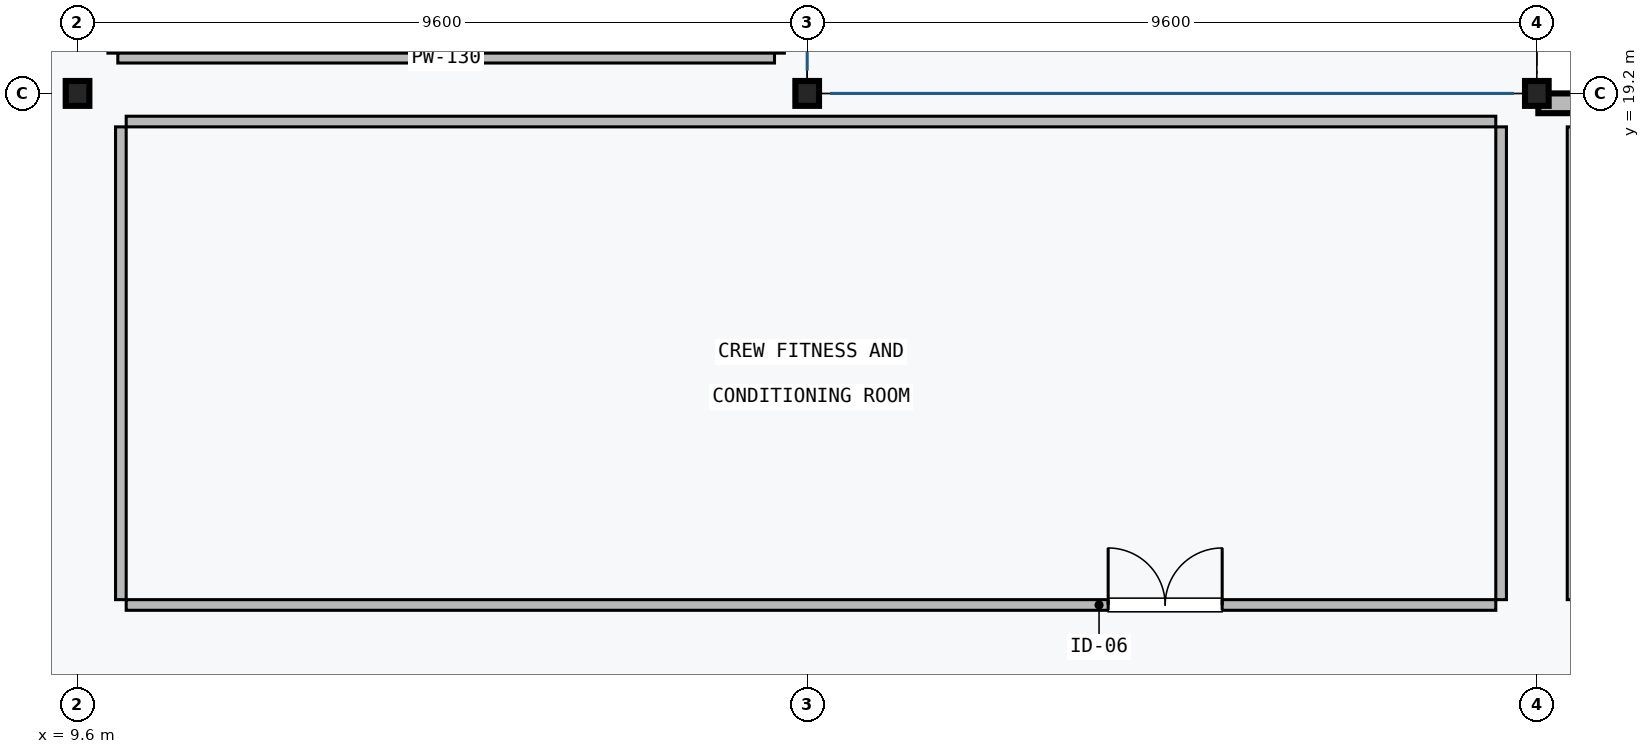
"""IFC4 building model, lengths in metres.
Left out: names, types, materials, properties, quantities, classifications, styles, units other than length and angle.
Written with IfcOpenShell. Run it as: python <this file> out.ifc"""

import sys

from ifc_helpers import new_model, si_unit, direction, frame, frame_2d, origin, origin_2d, place, context, subcontext, project, spatial, rectangle, i_section, extrude, element, fill, save


model = new_model("IFC4")
c1 = context("Model", 3, precision=1e-05, world=origin(), true_north=direction((0.0, 1.0)))
c2 = subcontext(c1, "Body", "Model", "MODEL_VIEW")
j1 = project(units=[si_unit("LENGTHUNIT", "METRE"), si_unit("PLANEANGLEUNIT", "RADIAN")], contexts=[c1])
p1 = place(None, origin())
s1 = spatial("IfcSite", under=j1, at=p1, CompositionType="ELEMENT")
p2 = place(p1, origin())
s2 = spatial("IfcBuilding", under=s1, at=p2, CompositionType="ELEMENT")
p3 = place(p2, frame((0.0, 0.0, 14.7)))
s3 = spatial("IfcBuildingStorey", under=s2, at=p3, CompositionType="ELEMENT", Elevation=14.7)
for number, where, z_axis, x_axis in (
    (1, (9.6, 19.2, 0.0), (0.0, 0.0, 1.0), (1.0, 0.0, 0.0)),
    (2, (19.2, 19.2, 0.0), (0.0, 0.0, 1.0), (1.0, 0.0, 0.0)),
    (3, (28.8, 19.2, 0.0), (0.0, 0.0, 1.0), (1.0, 0.0, 0.0)),
):
    element("IfcColumn", number, at=place(p3, frame(where, z_axis=z_axis, x_axis=x_axis)), inside=s3, PredefinedType="COLUMN", context=c2, shape_type="SweptSolid", body=[
        extrude(i_section(OverallWidth=0.311, OverallDepth=0.327, WebThickness=0.016, FlangeThickness=0.025, FilletRadius=0.015, at=origin_2d()), origin(), (0.0, 0.0, 1.0), 3.95),
    ])
p4 = place(p3, frame((28.82, 19.07, 0.0), z_axis=(0.0, 0.0, 1.0), x_axis=(1.0, 0.0, 0.0)))
e4 = element("IfcWall", 4, at=p4, inside=s3, PredefinedType="SOLIDWALL", context=c2, shape_type="SweptSolid", body=[
    extrude(rectangle(XDim=9.56, YDim=0.26, at=frame_2d((4.78, 0.0))), origin(), (0.0, 0.0, 1.0), 3.66),
])
p5 = place(p4, frame((3.28, 0.0, 0.9)))
e5 = element("IfcOpeningElement", 5, at=p5, cuts=e4, PredefinedType="OPENING", context=c2, shape_type="SweptSolid", body=[
    extrude(rectangle(XDim=3.0, YDim=2.1, at=frame_2d((1.5, 1.05))), frame((0.0, 0.14, 0.0), z_axis=(0.0, -1.0, 0.0), x_axis=(1.0, 0.0, 0.0)), (0.0, 0.0, 1.0), 0.28),
])
p6 = place(p3, frame((18.77, 19.665, 0.0), z_axis=(0.0, 0.0, 1.0), x_axis=(-1.0, 0.0, 0.0)))
e6 = element("IfcWall", 6, at=p6, inside=s3, PredefinedType="PARTITIONING", context=c2, shape_type="SweptSolid", body=[
    extrude(rectangle(XDim=8.64, YDim=0.13, at=frame_2d((4.32, 0.0))), origin(), (0.0, 0.0, 1.0), 3.59),
])
p7 = place(p3, frame((10.065, 19.73, 0.0), z_axis=(0.0, 0.0, 1.0), x_axis=(0.0, 1.0, 0.0)))
e7 = element("IfcWall", 7, at=p7, inside=s3, PredefinedType="PARTITIONING", context=c2, shape_type="SweptSolid", body=[
    extrude(rectangle(XDim=8.54, YDim=0.13, at=frame_2d((4.27, 0.0))), origin(), (0.0, 0.0, 1.0), 3.59),
])
p8 = place(p7, frame((3.78, 0.0, 0.0)))
e8 = element("IfcOpeningElement", 8, at=p8, cuts=e7, PredefinedType="OPENING", context=c2, shape_type="SweptSolid", body=[
    extrude(rectangle(XDim=0.98, YDim=2.15, at=frame_2d((0.49, 1.075))), frame((0.0, 0.075, 0.0), z_axis=(0.0, -1.0, 0.0), x_axis=(1.0, 0.0, 0.0)), (0.0, 0.0, 1.0), 0.15),
])
p9 = place(p3, frame((18.835, 28.27, 0.0), z_axis=(0.0, 0.0, 1.0), x_axis=(0.0, -1.0, 0.0)))
e9 = element("IfcWall", 9, at=p9, inside=s3, PredefinedType="PARTITIONING", context=c2, shape_type="SweptSolid", body=[
    extrude(rectangle(XDim=8.54, YDim=0.13, at=frame_2d((4.27, 0.0))), origin(), (0.0, 0.0, 1.0), 3.59),
])
p10 = place(p3, frame((28.26, 12.47, 0.0), z_axis=(0.0, 0.0, 1.0), x_axis=(-1.0, 0.0, 0.0)))
e10 = element("IfcWall", 10, at=p10, inside=s3, PredefinedType="PARTITIONING", context=c2, shape_type="SweptSolid", body=[
    extrude(rectangle(XDim=18.02, YDim=0.14, at=frame_2d((9.01, 0.0))), origin(), (0.0, 0.0, 1.0), 3.483),
])
p11 = place(p10, frame((3.6, 0.0, 0.0)))
e11 = element("IfcOpeningElement", 11, at=p11, cuts=e10, PredefinedType="OPENING", context=c2, shape_type="SweptSolid", body=[
    extrude(rectangle(XDim=1.5, YDim=2.25, at=frame_2d((0.75, 1.125))), frame((0.0, 0.08, 0.0), z_axis=(0.0, -1.0, 0.0), x_axis=(1.0, 0.0, 0.0)), (0.0, 0.0, 1.0), 0.16),
])
p12 = place(p3, frame((10.24, 18.83, 0.0), z_axis=(0.0, 0.0, 1.0), x_axis=(1.0, 0.0, 0.0)))
e12 = element("IfcWall", 12, at=p12, inside=s3, PredefinedType="PARTITIONING", context=c2, shape_type="SweptSolid", body=[
    extrude(rectangle(XDim=18.02, YDim=0.14, at=frame_2d((9.01, 0.0))), origin(), (0.0, 0.0, 1.0), 3.483),
])
for number, where, z_axis, x_axis in (
    (13, (10.17, 12.54, 0.0), (0.0, 0.0, 1.0), (0.0, 1.0, 0.0)),
    (14, (28.33, 18.76, 0.0), (0.0, 0.0, 1.0), (0.0, -1.0, 0.0)),
    (15, (29.27, 12.54, 0.0), (0.0, 0.0, 1.0), (0.0, 1.0, 0.0)),
):
    element("IfcWall", number, at=place(p3, frame(where, z_axis=z_axis, x_axis=x_axis)), inside=s3, PredefinedType="PARTITIONING", context=c2, shape_type="SweptSolid", body=[
        extrude(rectangle(XDim=6.22, YDim=0.14, at=frame_2d((3.11, 0.0))), origin(), (0.0, 0.0, 1.0), 3.59),
    ])
p13 = place(p11, frame((1.5, 0.0, 0.0), z_axis=(0.0, 0.0, 1.0), x_axis=(-1.0, 0.0, 0.0)))
e16 = element("IfcDoor", 16, at=p13, inside=s3, OperationType="DOUBLE_DOOR_SINGLE_SWING", PredefinedType="DOOR", context=c2, shape_type="SweptSolid", body=[
    extrude(rectangle(XDim=1.5, YDim=2.25, at=frame_2d((0.75, 1.125))), frame((0.0, 0.025, 0.0), z_axis=(0.0, -1.0, 0.0), x_axis=(1.0, 0.0, 0.0)), (0.0, 0.0, 1.0), 0.05),
])
fill(e11, e16)
save(model, sys.argv[1])
